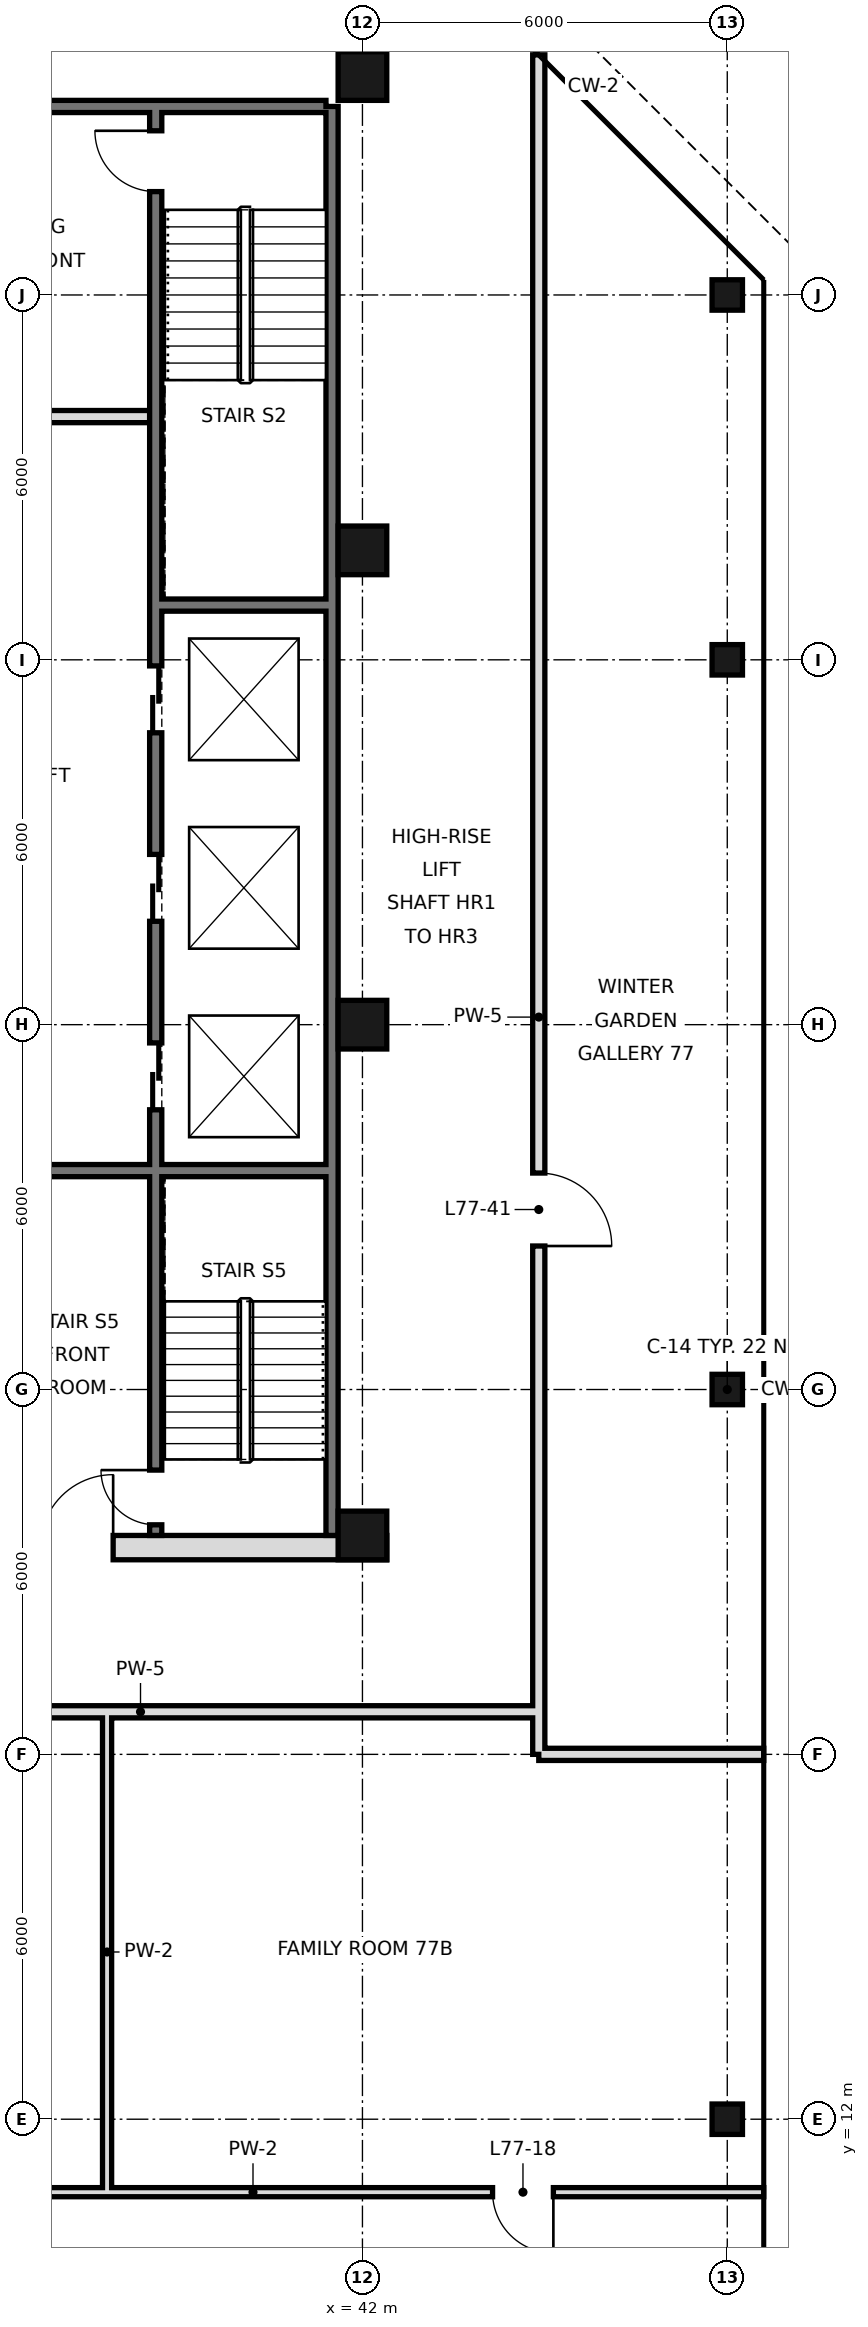
"""IFC4 building model, lengths in metres.
Left out: names, types, materials, properties, quantities, classifications, styles, units other than length and angle.
Written with IfcOpenShell. Run it as: python <this file> out.ifc"""

import sys

from ifc_helpers import new_model, si_unit, direction, frame, frame_2d, origin, origin_2d, place, context, subcontext, project, spatial, rectangle, hollow_rectangle, extrude, element, fill, save


model = new_model("IFC4")
c1 = context("Model", 3, precision=1e-05, world=origin(), true_north=direction((0.0, 1.0)))
c2 = subcontext(c1, "Body", "Model", "MODEL_VIEW")
j1 = project(units=[si_unit("LENGTHUNIT", "METRE"), si_unit("PLANEANGLEUNIT", "RADIAN")], contexts=[c1])
p1 = place(None, origin())
s1 = spatial("IfcSite", under=j1, at=p1, CompositionType="ELEMENT")
p2 = place(p1, origin())
s2 = spatial("IfcBuilding", under=s1, at=p2, CompositionType="ELEMENT")
p3 = place(p2, frame((0.0, 0.0, 323.2)))
s3 = spatial("IfcBuildingStorey", under=s2, at=p3, CompositionType="ELEMENT", Elevation=323.2)
for number, where, z_axis, x_axis in (
    (1, (42.0, 21.6, 0.0), (0.0, 0.0, 1.0), (1.0, 0.0, 0.0)),
    (2, (42.0, 30.0, 0.0), (0.0, 0.0, 1.0), (1.0, 0.0, 0.0)),
    (3, (42.0, 37.8, 0.0), (0.0, 0.0, 1.0), (1.0, 0.0, 0.0)),
    (4, (42.0, 45.6, 0.0), (0.0, 0.0, 1.0), (1.0, 0.0, 0.0)),
):
    element("IfcColumn", number, at=place(p3, frame(where, z_axis=z_axis, x_axis=x_axis)), inside=s3, PredefinedType="COLUMN", context=c2, shape_type="SweptSolid", body=[
        extrude(hollow_rectangle(XDim=0.8, YDim=0.8, WallThickness=0.025, at=origin_2d()), origin(), (0.0, 0.0, 1.0), 3.6),
    ])
for number, where, z_axis, x_axis in (
    (5, (48.0, 12.0, 0.0), (0.0, 0.0, 1.0), (1.0, 0.0, 0.0)),
    (6, (48.0, 24.0, 0.0), (0.0, 0.0, 1.0), (1.0, 0.0, 0.0)),
    (7, (48.0, 36.0, 0.0), (0.0, 0.0, 1.0), (1.0, 0.0, 0.0)),
    (8, (48.0, 42.0, 0.0), (0.0, 0.0, 1.0), (1.0, 0.0, 0.0)),
):
    element("IfcColumn", number, at=place(p3, frame(where, z_axis=z_axis, x_axis=x_axis)), inside=s3, PredefinedType="COLUMN", context=c2, shape_type="SweptSolid", body=[
        extrude(hollow_rectangle(XDim=0.5, YDim=0.5, WallThickness=0.025, at=origin_2d()), origin(), (0.0, 0.0, 1.0), 3.6),
    ])
p4 = place(p3, frame((37.8, 10.8, 0.0), z_axis=(0.0, 0.0, 1.0), x_axis=(0.0, 1.0, 0.0)))
e9 = element("IfcWall", 9, at=p4, inside=s3, PredefinedType="PARTITIONING", context=c2, shape_type="SweptSolid", body=[
    extrude(rectangle(XDim=7.9, YDim=0.15, at=frame_2d((3.95, 0.0))), origin(), (0.0, 0.0, 1.0), 3.42),
])
p5 = place(p3, frame((44.9, 18.0, 0.0), z_axis=(0.0, 0.0, 1.0), x_axis=(0.0, 1.0, 0.0)))
e10 = element("IfcWall", 10, at=p5, inside=s3, PredefinedType="SOLIDWALL", context=c2, shape_type="SweptSolid", body=[
    extrude(rectangle(XDim=27.949, YDim=0.2, at=frame_2d((13.975, 0.0))), origin(), (0.0, 0.0, 1.0), 2.97),
])
p6 = place(p5, frame((8.36, 0.0, 0.0)))
e11 = element("IfcOpeningElement", 11, at=p6, cuts=e10, PredefinedType="OPENING", context=c2, shape_type="SweptSolid", body=[
    extrude(rectangle(XDim=1.2, YDim=2.4, at=frame_2d((0.6, 1.2))), frame((0.0, 0.11, 0.0), z_axis=(0.0, -1.0, 0.0), x_axis=(1.0, 0.0, 0.0)), (0.0, 0.0, 1.0), 0.22),
])
p7 = place(p3, frame((31.8, 10.8, 0.0), z_axis=(0.0, 0.0, 1.0), x_axis=(1.0, 0.0, 0.0)))
e12 = element("IfcWall", 12, at=p7, inside=s3, PredefinedType="PARTITIONING", context=c2, shape_type="SweptSolid", body=[
    extrude(rectangle(XDim=16.8, YDim=0.15, at=frame_2d((8.4, 0.0))), origin(), (0.0, 0.0, 1.0), 3.42),
])
p8 = place(p7, frame((2.5, 0.0, 0.0)))
e13 = element("IfcOpeningElement", 13, at=p8, cuts=e12, PredefinedType="OPENING", context=c2, shape_type="SweptSolid", body=[
    extrude(rectangle(XDim=1.0, YDim=2.4, at=frame_2d((0.5, 1.2))), frame((0.0, 0.085, 0.0), z_axis=(0.0, -1.0, 0.0), x_axis=(1.0, 0.0, 0.0)), (0.0, 0.0, 1.0), 0.17),
])
p9 = place(p7, frame((12.34, 0.0, 0.0)))
e14 = element("IfcOpeningElement", 14, at=p9, cuts=e12, PredefinedType="OPENING", context=c2, shape_type="SweptSolid", body=[
    extrude(rectangle(XDim=1.0, YDim=2.4, at=frame_2d((0.5, 1.2))), frame((0.0, 0.085, 0.0), z_axis=(0.0, -1.0, 0.0), x_axis=(1.0, 0.0, 0.0)), (0.0, 0.0, 1.0), 0.17),
])
p10 = place(p3, frame((44.9, 18.0, 0.0), z_axis=(0.0, 0.0, 1.0), x_axis=(1.0, 0.0, 0.0)))
e15 = element("IfcWall", 15, at=p10, inside=s3, PredefinedType="SOLIDWALL", context=c2, shape_type="SweptSolid", body=[
    extrude(rectangle(XDim=3.7, YDim=0.2, at=frame_2d((1.85, 0.0))), origin(), (0.0, 0.0, 1.0), 2.72),
])
p11 = place(p3, frame((31.8, 18.7, 0.0), z_axis=(0.0, 0.0, 1.0), x_axis=(1.0, 0.0, 0.0)))
e16 = element("IfcWall", 16, at=p11, inside=s3, PredefinedType="SOLIDWALL", context=c2, shape_type="SweptSolid", body=[
    extrude(rectangle(XDim=13.1, YDim=0.2, at=frame_2d((6.55, 0.0))), origin(), (0.0, 0.0, 1.0), 2.72),
])
p12 = place(p11, frame((2.4, 0.0, 0.0)))
e17 = element("IfcOpeningElement", 17, at=p12, cuts=e16, PredefinedType="OPENING", context=c2, shape_type="SweptSolid", body=[
    extrude(rectangle(XDim=1.2, YDim=2.4, at=frame_2d((0.6, 1.2))), frame((0.0, 0.11, 0.0), z_axis=(0.0, -1.0, 0.0), x_axis=(1.0, 0.0, 0.0)), (0.0, 0.0, 1.0), 0.22),
])
p13 = place(p3, frame((41.5, 21.6, 0.0), z_axis=(0.0, 0.0, 1.0), x_axis=(0.0, 1.0, 0.0)))
e18 = element("IfcWall", 18, at=p13, inside=s3, PredefinedType="SOLIDWALL", context=c2, shape_type="SweptSolid", body=[
    extrude(rectangle(XDim=23.5, YDim=0.2, at=frame_2d((11.75, 0.0))), origin(), (0.0, 0.0, 1.0), 3.42),
])
p14 = place(p3, frame((6.6, 45.1, 0.0), z_axis=(0.0, 0.0, 1.0), x_axis=(1.0, 0.0, 0.0)))
e19 = element("IfcWall", 19, at=p14, inside=s3, PredefinedType="SOLIDWALL", context=c2, shape_type="SweptSolid", body=[
    extrude(rectangle(XDim=34.8, YDim=0.2, at=frame_2d((17.4, 0.0))), origin(), (0.0, 0.0, 1.0), 3.42),
])
p15 = place(p3, frame((5.6, 21.4, 0.0), z_axis=(0.0, 0.0, 1.0), x_axis=(1.0, 0.0, 0.0)))
e20 = element("IfcWall", 20, at=p15, inside=s3, PredefinedType="SOLIDWALL", context=c2, shape_type="SweptSolid", body=[
    extrude(rectangle(XDim=36.8, YDim=0.4, at=frame_2d((18.4, 0.0))), origin(), (0.0, 0.0, 1.0), 3.42),
])
p16 = place(p15, frame((8.5, 0.0, 0.0)))
e21 = element("IfcOpeningElement", 21, at=p16, cuts=e20, PredefinedType="OPENING", context=c2, shape_type="SweptSolid", body=[
    extrude(rectangle(XDim=1.8, YDim=2.1, at=frame_2d((0.9, 1.05))), frame((0.0, 0.21, 0.0), z_axis=(0.0, -1.0, 0.0), x_axis=(1.0, 0.0, 0.0)), (0.0, 0.0, 1.0), 0.42),
])
p17 = place(p15, frame((17.5, 0.0, 0.0)))
e22 = element("IfcOpeningElement", 22, at=p17, cuts=e20, PredefinedType="OPENING", context=c2, shape_type="SweptSolid", body=[
    extrude(rectangle(XDim=1.8, YDim=2.1, at=frame_2d((0.9, 1.05))), frame((0.0, 0.21, 0.0), z_axis=(0.0, -1.0, 0.0), x_axis=(1.0, 0.0, 0.0)), (0.0, 0.0, 1.0), 0.42),
])
p18 = place(p15, frame((26.5, 0.0, 0.0)))
e23 = element("IfcOpeningElement", 23, at=p18, cuts=e20, PredefinedType="OPENING", context=c2, shape_type="SweptSolid", body=[
    extrude(rectangle(XDim=1.8, YDim=2.1, at=frame_2d((0.9, 1.05))), frame((0.0, 0.21, 0.0), z_axis=(0.0, -1.0, 0.0), x_axis=(1.0, 0.0, 0.0)), (0.0, 0.0, 1.0), 0.42),
])
p19 = place(p15, frame((4.5, 0.0, 0.0)))
e24 = element("IfcOpeningElement", 24, at=p19, cuts=e20, PredefinedType="OPENING", context=c2, shape_type="SweptSolid", body=[
    extrude(rectangle(XDim=1.2, YDim=2.1, at=frame_2d((0.6, 1.05))), frame((0.0, 0.21, 0.0), z_axis=(0.0, -1.0, 0.0), x_axis=(1.0, 0.0, 0.0)), (0.0, 0.0, 1.0), 0.42),
])
p20 = place(p15, frame((31.1, 0.0, 0.0)))
e25 = element("IfcOpeningElement", 25, at=p20, cuts=e20, PredefinedType="OPENING", context=c2, shape_type="SweptSolid", body=[
    extrude(rectangle(XDim=1.2, YDim=2.1, at=frame_2d((0.6, 1.05))), frame((0.0, 0.21, 0.0), z_axis=(0.0, -1.0, 0.0), x_axis=(1.0, 0.0, 0.0)), (0.0, 0.0, 1.0), 0.42),
])
p21 = place(p3, frame((38.6, 21.6, 0.0), z_axis=(0.0, 0.0, 1.0), x_axis=(0.0, 1.0, 0.0)))
e26 = element("IfcWall", 26, at=p21, inside=s3, PredefinedType="SOLIDWALL", context=c2, shape_type="SweptSolid", body=[
    extrude(rectangle(XDim=23.4, YDim=0.2, at=frame_2d((11.7, 0.0))), origin(), (0.0, 0.0, 1.0), 3.42),
])
p22 = place(p21, frame((7.0, 0.0, 0.0)))
e27 = element("IfcOpeningElement", 27, at=p22, cuts=e26, PredefinedType="OPENING", context=c2, shape_type="SweptSolid", body=[
    extrude(rectangle(XDim=1.1, YDim=2.1, at=frame_2d((0.55, 1.05))), frame((0.0, 0.11, 0.0), z_axis=(0.0, -1.0, 0.0), x_axis=(1.0, 0.0, 0.0)), (0.0, 0.0, 1.0), 0.22),
])
p23 = place(p21, frame((10.1, 0.0, 0.0)))
e28 = element("IfcOpeningElement", 28, at=p23, cuts=e26, PredefinedType="OPENING", context=c2, shape_type="SweptSolid", body=[
    extrude(rectangle(XDim=1.1, YDim=2.1, at=frame_2d((0.55, 1.05))), frame((0.0, 0.11, 0.0), z_axis=(0.0, -1.0, 0.0), x_axis=(1.0, 0.0, 0.0)), (0.0, 0.0, 1.0), 0.22),
])
p24 = place(p21, frame((13.2, 0.0, 0.0)))
e29 = element("IfcOpeningElement", 29, at=p24, cuts=e26, PredefinedType="OPENING", context=c2, shape_type="SweptSolid", body=[
    extrude(rectangle(XDim=1.1, YDim=2.1, at=frame_2d((0.55, 1.05))), frame((0.0, 0.11, 0.0), z_axis=(0.0, -1.0, 0.0), x_axis=(1.0, 0.0, 0.0)), (0.0, 0.0, 1.0), 0.22),
])
p25 = place(p21, frame((22.1, 0.0, 0.0)))
e30 = element("IfcOpeningElement", 30, at=p25, cuts=e26, PredefinedType="OPENING", context=c2, shape_type="SweptSolid", body=[
    extrude(rectangle(XDim=1.0, YDim=2.1, at=frame_2d((0.5, 1.05))), frame((0.0, 0.11, 0.0), z_axis=(0.0, -1.0, 0.0), x_axis=(1.0, 0.0, 0.0)), (0.0, 0.0, 1.0), 0.22),
])
p26 = place(p21, frame((0.175, 0.0, 0.0)))
e31 = element("IfcOpeningElement", 31, at=p26, cuts=e26, PredefinedType="OPENING", context=c2, shape_type="SweptSolid", body=[
    extrude(rectangle(XDim=0.9, YDim=2.1, at=frame_2d((0.45, 1.05))), frame((0.0, 0.11, 0.0), z_axis=(0.0, -1.0, 0.0), x_axis=(1.0, 0.0, 0.0)), (0.0, 0.0, 1.0), 0.22),
])
p27 = place(p3, frame((36.1, 27.6, 0.0), z_axis=(0.0, 0.0, 1.0), x_axis=(1.0, 0.0, 0.0)))
e32 = element("IfcWall", 32, at=p27, inside=s3, PredefinedType="SOLIDWALL", context=c2, shape_type="SweptSolid", body=[
    extrude(rectangle(XDim=5.3, YDim=0.2, at=frame_2d((2.65, 0.0))), origin(), (0.0, 0.0, 1.0), 3.42),
])
p28 = place(p3, frame((38.7, 36.9, 0.0), z_axis=(0.0, 0.0, 1.0), x_axis=(1.0, 0.0, 0.0)))
e33 = element("IfcWall", 33, at=p28, inside=s3, PredefinedType="SOLIDWALL", context=c2, shape_type="SweptSolid", body=[
    extrude(rectangle(XDim=2.7, YDim=0.2, at=frame_2d((1.35, 0.0))), origin(), (0.0, 0.0, 1.0), 3.42),
])
p29 = place(p3, frame((33.5, 40.0, 0.0), z_axis=(0.0, 0.0, 1.0), x_axis=(1.0, 0.0, 0.0)))
e34 = element("IfcWall", 34, at=p29, inside=s3, PredefinedType="PARTITIONING", context=c2, shape_type="SweptSolid", body=[
    extrude(rectangle(XDim=5.0, YDim=0.2, at=frame_2d((2.5, 0.0))), origin(), (0.0, 0.0, 1.0), 3.42),
])
p30 = place(p29, frame((1.9, 0.0, 0.0)))
e35 = element("IfcOpeningElement", 35, at=p30, cuts=e34, PredefinedType="OPENING", context=c2, shape_type="SweptSolid", body=[
    extrude(rectangle(XDim=1.2, YDim=2.1, at=frame_2d((0.6, 1.05))), frame((0.0, 0.11, 0.0), z_axis=(0.0, -1.0, 0.0), x_axis=(1.0, 0.0, 0.0)), (0.0, 0.0, 1.0), 0.22),
])
p31 = place(p9, origin())
e36 = element("IfcDoor", 36, at=p31, inside=s3, OperationType="SINGLE_SWING_RIGHT", PredefinedType="DOOR", context=c2, shape_type="SweptSolid", body=[
    extrude(rectangle(XDim=1.0, YDim=2.4, at=frame_2d((0.5, 1.2))), frame((0.0, 0.025, 0.0), z_axis=(0.0, -1.0, 0.0), x_axis=(1.0, 0.0, 0.0)), (0.0, 0.0, 1.0), 0.05),
])
fill(e14, e36)
p32 = place(p6, frame((1.2, 0.0, 0.0), z_axis=(0.0, 0.0, 1.0), x_axis=(-1.0, 0.0, 0.0)))
e37 = element("IfcDoor", 37, at=p32, inside=s3, OperationType="SINGLE_SWING_RIGHT", PredefinedType="DOOR", context=c2, shape_type="SweptSolid", body=[
    extrude(rectangle(XDim=1.2, YDim=2.4, at=frame_2d((0.6, 1.2))), frame((0.0, 0.025, 0.0), z_axis=(0.0, -1.0, 0.0), x_axis=(1.0, 0.0, 0.0)), (0.0, 0.0, 1.0), 0.05),
])
fill(e11, e37)
p33 = place(p20, frame((1.2, 0.0, 0.0), z_axis=(0.0, 0.0, 1.0), x_axis=(-1.0, 0.0, 0.0)))
e38 = element("IfcDoor", 38, at=p33, inside=s3, OperationType="SINGLE_SWING_LEFT", PredefinedType="DOOR", context=c2, shape_type="SweptSolid", body=[
    extrude(rectangle(XDim=1.2, YDim=2.1, at=frame_2d((0.6, 1.05))), frame((0.0, 0.025, 0.0), z_axis=(0.0, -1.0, 0.0), x_axis=(1.0, 0.0, 0.0)), (0.0, 0.0, 1.0), 0.05),
])
fill(e25, e38)
p34 = place(p22, origin())
e39 = element("IfcDoor", 39, at=p34, inside=s3, OperationType="DOUBLE_DOOR_SLIDING", PredefinedType="DOOR", context=c2, shape_type="SweptSolid", body=[
    extrude(rectangle(XDim=1.1, YDim=2.1, at=frame_2d((0.55, 1.05))), frame((0.0, 0.025, 0.0), z_axis=(0.0, -1.0, 0.0), x_axis=(1.0, 0.0, 0.0)), (0.0, 0.0, 1.0), 0.05),
])
fill(e27, e39)
p35 = place(p23, origin())
e40 = element("IfcDoor", 40, at=p35, inside=s3, OperationType="DOUBLE_DOOR_SLIDING", PredefinedType="DOOR", context=c2, shape_type="SweptSolid", body=[
    extrude(rectangle(XDim=1.1, YDim=2.1, at=frame_2d((0.55, 1.05))), frame((0.0, 0.025, 0.0), z_axis=(0.0, -1.0, 0.0), x_axis=(1.0, 0.0, 0.0)), (0.0, 0.0, 1.0), 0.05),
])
fill(e28, e40)
p36 = place(p24, origin())
e41 = element("IfcDoor", 41, at=p36, inside=s3, OperationType="DOUBLE_DOOR_SLIDING", PredefinedType="DOOR", context=c2, shape_type="SweptSolid", body=[
    extrude(rectangle(XDim=1.1, YDim=2.1, at=frame_2d((0.55, 1.05))), frame((0.0, 0.025, 0.0), z_axis=(0.0, -1.0, 0.0), x_axis=(1.0, 0.0, 0.0)), (0.0, 0.0, 1.0), 0.05),
])
fill(e29, e41)
p37 = place(p25, frame((1.0, 0.0, 0.0), z_axis=(0.0, 0.0, 1.0), x_axis=(-1.0, 0.0, 0.0)))
e42 = element("IfcDoor", 42, at=p37, inside=s3, OperationType="SINGLE_SWING_LEFT", PredefinedType="DOOR", context=c2, shape_type="SweptSolid", body=[
    extrude(rectangle(XDim=1.0, YDim=2.1, at=frame_2d((0.5, 1.05))), frame((0.0, 0.025, 0.0), z_axis=(0.0, -1.0, 0.0), x_axis=(1.0, 0.0, 0.0)), (0.0, 0.0, 1.0), 0.05),
])
fill(e30, e42)
p38 = place(p26, frame((0.9, 0.0, 0.0), z_axis=(0.0, 0.0, 1.0), x_axis=(-1.0, 0.0, 0.0)))
e43 = element("IfcDoor", 43, at=p38, inside=s3, OperationType="SINGLE_SWING_LEFT", PredefinedType="DOOR", context=c2, shape_type="SweptSolid", body=[
    extrude(rectangle(XDim=0.9, YDim=2.1, at=frame_2d((0.45, 1.05))), frame((0.0, 0.025, 0.0), z_axis=(0.0, -1.0, 0.0), x_axis=(1.0, 0.0, 0.0)), (0.0, 0.0, 1.0), 0.05),
])
fill(e31, e43)
save(model, sys.argv[1])
